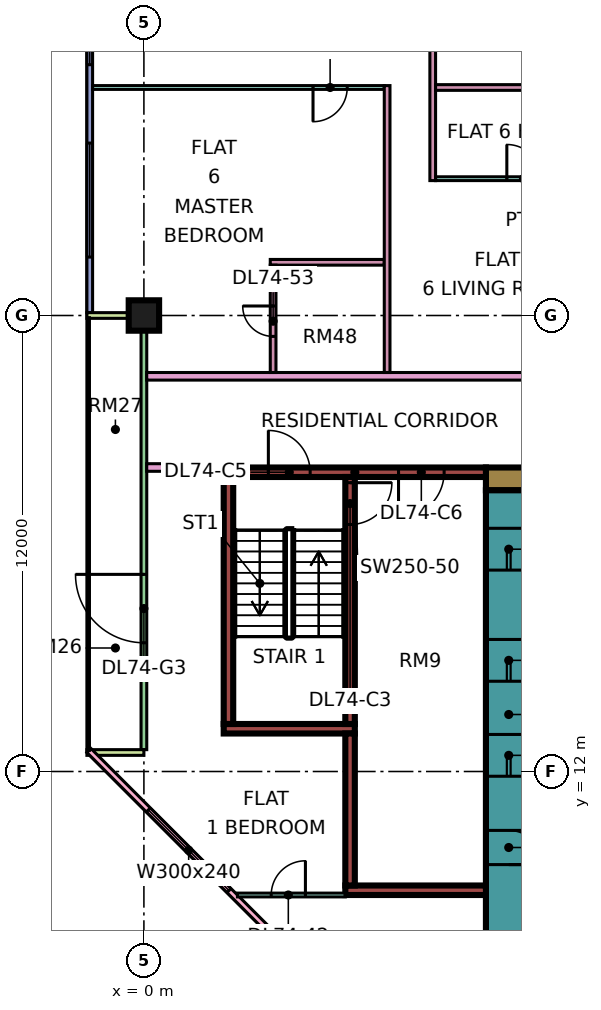
"""IFC4 building model, lengths in metres.
Left out: names, types, materials, properties, quantities, classifications, styles, units other than length and angle.
Written with IfcOpenShell. Run it as: python <this file> out.ifc"""

import sys

from ifc_helpers import new_model, si_unit, direction, frame, frame_2d, origin, origin_2d, place, context, subcontext, project, spatial, rectangle, extrude, element, fill, save


model = new_model("IFC4")
c1 = context("Model", 3, precision=1e-05, world=origin(), true_north=direction((0.0, 1.0)))
c2 = subcontext(c1, "Body", "Model", "MODEL_VIEW")
j1 = project(units=[si_unit("LENGTHUNIT", "METRE"), si_unit("PLANEANGLEUNIT", "RADIAN")], contexts=[c1])
p1 = place(None, origin())
s1 = spatial("IfcSite", under=j1, at=p1, CompositionType="ELEMENT")
p2 = place(p1, origin())
s2 = spatial("IfcBuilding", under=s1, at=p2, CompositionType="ELEMENT")
p3 = place(p2, frame((0.0, 0.0, 314.65)))
s3 = spatial("IfcBuildingStorey", under=s2, at=p3, CompositionType="ELEMENT", Elevation=314.65)
p4 = place(p3, frame((0.0, 24.0, 0.0), z_axis=(0.0, 0.0, 1.0), x_axis=(1.0, 0.0, 0.0)))
e1 = element("IfcColumn", 1, at=p4, inside=s3, PredefinedType="COLUMN", context=c2, shape_type="SweptSolid", body=[
    extrude(rectangle(XDim=0.8, YDim=0.8, at=origin_2d()), origin(), (0.0, 0.0, 1.0), 3.75),
])
p5 = place(p3, frame((9.0, 19.7, 0.0), z_axis=(0.0, 0.0, 1.0), x_axis=(1.0, 0.0, 0.0)))
e2 = element("IfcWall", 2, at=p5, inside=s3, PredefinedType="SHEAR", context=c2, shape_type="SweptSolid", body=[
    extrude(rectangle(XDim=25.0, YDim=0.6, at=frame_2d((12.5, 0.0))), origin(), (0.0, 0.0, 1.0), 3.75),
])
p6 = place(p5, frame((19.1, 0.0, 0.0)))
e3 = element("IfcOpeningElement", 3, at=p6, cuts=e2, PredefinedType="OPENING", context=c2, shape_type="SweptSolid", body=[
    extrude(rectangle(XDim=1.8, YDim=2.4, at=frame_2d((0.9, 1.2))), frame((0.0, 0.31, 0.0), z_axis=(0.0, -1.0, 0.0), x_axis=(1.0, 0.0, 0.0)), (0.0, 0.0, 1.0), 0.62),
])
p7 = place(p3, frame((9.6, 7.6, 0.0), z_axis=(0.0, 0.0, 1.0), x_axis=(0.0, 1.0, 0.0)))
e4 = element("IfcWall", 4, at=p7, inside=s3, PredefinedType="SHEAR", context=c2, shape_type="SweptSolid", body=[
    extrude(rectangle(XDim=11.8, YDim=1.2, at=frame_2d((5.9, 0.0))), origin(), (0.0, 0.0, 1.0), 3.75),
])
p8 = place(p7, frame((4.275, 0.0, 0.0)))
e5 = element("IfcOpeningElement", 5, at=p8, cuts=e4, PredefinedType="OPENING", context=c2, shape_type="SweptSolid", body=[
    extrude(rectangle(XDim=1.1, YDim=2.2, at=frame_2d((0.55, 1.1))), frame((0.0, 0.61, 0.0), z_axis=(0.0, -1.0, 0.0), x_axis=(1.0, 0.0, 0.0)), (0.0, 0.0, 1.0), 1.22),
])
p9 = place(p7, frame((6.775, 0.0, 0.0)))
e6 = element("IfcOpeningElement", 6, at=p9, cuts=e4, PredefinedType="OPENING", context=c2, shape_type="SweptSolid", body=[
    extrude(rectangle(XDim=1.1, YDim=2.2, at=frame_2d((0.55, 1.1))), frame((0.0, 0.61, 0.0), z_axis=(0.0, -1.0, 0.0), x_axis=(1.0, 0.0, 0.0)), (0.0, 0.0, 1.0), 1.22),
])
p10 = place(p7, frame((9.7, 0.0, 0.0)))
e7 = element("IfcOpeningElement", 7, at=p10, cuts=e4, PredefinedType="OPENING", context=c2, shape_type="SweptSolid", body=[
    extrude(rectangle(XDim=1.1, YDim=2.2, at=frame_2d((0.55, 1.1))), frame((0.0, 0.61, 0.0), z_axis=(0.0, -1.0, 0.0), x_axis=(1.0, 0.0, 0.0)), (0.0, 0.0, 1.0), 1.22),
])
p11 = place(p7, frame((1.95, 0.0, 0.0)))
e8 = element("IfcOpeningElement", 8, at=p11, cuts=e4, PredefinedType="OPENING", context=c2, shape_type="SweptSolid", body=[
    extrude(rectangle(XDim=0.9, YDim=2.1, at=frame_2d((0.45, 1.05))), frame((0.0, 0.61, 0.0), z_axis=(0.0, -1.0, 0.0), x_axis=(1.0, 0.0, 0.0)), (0.0, 0.0, 1.0), 1.22),
])
p12 = place(p3, frame((2.1, 19.875, 0.0), z_axis=(0.0, 0.0, 1.0), x_axis=(1.0, 0.0, 0.0)))
e9 = element("IfcWall", 9, at=p12, inside=s3, PredefinedType="SHEAR", context=c2, shape_type="SweptSolid", body=[
    extrude(rectangle(XDim=6.9, YDim=0.25, at=frame_2d((3.45, 0.0))), origin(), (0.0, 0.0, 1.0), 3.75),
])
p13 = place(p12, frame((1.175, 0.0, 0.0)))
e10 = element("IfcOpeningElement", 10, at=p13, cuts=e9, PredefinedType="OPENING", context=c2, shape_type="SweptSolid", body=[
    extrude(rectangle(XDim=1.1, YDim=2.2, at=frame_2d((0.55, 1.1))), frame((0.0, 0.135, 0.0), z_axis=(0.0, -1.0, 0.0), x_axis=(1.0, 0.0, 0.0)), (0.0, 0.0, 1.0), 0.27),
])
p14 = place(p12, frame((4.6, 0.0, 0.0)))
e11 = element("IfcOpeningElement", 11, at=p14, cuts=e9, PredefinedType="OPENING", context=c2, shape_type="SweptSolid", body=[
    extrude(rectangle(XDim=1.2, YDim=2.2, at=frame_2d((0.6, 1.1))), frame((0.0, 0.135, 0.0), z_axis=(0.0, -1.0, 0.0), x_axis=(1.0, 0.0, 0.0)), (0.0, 0.0, 1.0), 0.27),
])
p15 = place(p3, frame((2.1, 13.125, 0.0), z_axis=(0.0, 0.0, 1.0), x_axis=(1.0, 0.0, 0.0)))
e12 = element("IfcWall", 12, at=p15, inside=s3, PredefinedType="SHEAR", context=c2, shape_type="SweptSolid", body=[
    extrude(rectangle(XDim=3.45, YDim=0.25, at=frame_2d((1.725, 0.0))), origin(), (0.0, 0.0, 1.0), 3.75),
])
p16 = place(p3, frame((2.225, 13.25, 0.0), z_axis=(0.0, 0.0, 1.0), x_axis=(0.0, 1.0, 0.0)))
e13 = element("IfcWall", 13, at=p16, inside=s3, PredefinedType="SHEAR", context=c2, shape_type="SweptSolid", body=[
    extrude(rectangle(XDim=6.5, YDim=0.25, at=frame_2d((3.25, 0.0))), origin(), (0.0, 0.0, 1.0), 3.75),
])
p17 = place(p3, frame((5.425, 13.25, 0.0), z_axis=(0.0, 0.0, 1.0), x_axis=(0.0, 1.0, 0.0)))
e14 = element("IfcWall", 14, at=p17, inside=s3, PredefinedType="SHEAR", context=c2, shape_type="SweptSolid", body=[
    extrude(rectangle(XDim=6.5, YDim=0.25, at=frame_2d((3.25, 0.0))), origin(), (0.0, 0.0, 1.0), 3.75),
])
p18 = place(p17, frame((5.25, 0.0, 0.0)))
e15 = element("IfcOpeningElement", 15, at=p18, cuts=e14, PredefinedType="OPENING", context=c2, shape_type="SweptSolid", body=[
    extrude(rectangle(XDim=1.1, YDim=2.2, at=frame_2d((0.55, 1.1))), frame((0.0, 0.135, 0.0), z_axis=(0.0, -1.0, 0.0), x_axis=(1.0, 0.0, 0.0)), (0.0, 0.0, 1.0), 0.27),
])
p19 = place(p3, frame((5.3, 8.875, 0.0), z_axis=(0.0, 0.0, 1.0), x_axis=(1.0, 0.0, 0.0)))
e16 = element("IfcWall", 16, at=p19, inside=s3, PredefinedType="SHEAR", context=c2, shape_type="SweptSolid", body=[
    extrude(rectangle(XDim=3.7, YDim=0.25, at=frame_2d((1.85, 0.0))), origin(), (0.0, 0.0, 1.0), 3.75),
])
p20 = place(p3, frame((5.425, 9.0, 0.0), z_axis=(0.0, 0.0, 1.0), x_axis=(0.0, 1.0, 0.0)))
e17 = element("IfcWall", 17, at=p20, inside=s3, PredefinedType="SHEAR", context=c2, shape_type="SweptSolid", body=[
    extrude(rectangle(XDim=4.0, YDim=0.25, at=frame_2d((2.0, 0.0))), origin(), (0.0, 0.0, 1.0), 3.75),
])
p21 = place(p3, frame((-1.425, 35.925, 0.0), z_axis=(0.0, 0.0, 1.0), x_axis=(0.0, -1.0, 0.0)))
e18 = element("IfcWall", 18, at=p21, inside=s3, PredefinedType="SOLIDWALL", context=c2, shape_type="SweptSolid", body=[
    extrude(rectangle(XDim=11.85, YDim=0.15, at=frame_2d((5.925, 0.0))), origin(), (0.0, 0.0, 1.0), 3.35),
])
p22 = place(p21, frame((0.562, 0.0, 0.45)))
e19 = element("IfcOpeningElement", 19, at=p22, cuts=e18, PredefinedType="OPENING", context=c2, shape_type="SweptSolid", body=[
    extrude(rectangle(XDim=1.8, YDim=2.4, at=frame_2d((0.9, 1.2))), frame((0.0, 0.085, 0.0), z_axis=(0.0, -1.0, 0.0), x_axis=(1.0, 0.0, 0.0)), (0.0, 0.0, 1.0), 0.17),
])
p23 = place(p21, frame((3.525, 0.0, 0.45)))
e20 = element("IfcOpeningElement", 20, at=p23, cuts=e18, PredefinedType="OPENING", context=c2, shape_type="SweptSolid", body=[
    extrude(rectangle(XDim=1.8, YDim=2.4, at=frame_2d((0.9, 1.2))), frame((0.0, 0.085, 0.0), z_axis=(0.0, -1.0, 0.0), x_axis=(1.0, 0.0, 0.0)), (0.0, 0.0, 1.0), 0.17),
])
p24 = place(p21, frame((7.387, 0.0, 0.45)))
e21 = element("IfcOpeningElement", 21, at=p24, cuts=e18, PredefinedType="OPENING", context=c2, shape_type="SweptSolid", body=[
    extrude(rectangle(XDim=3.0, YDim=2.4, at=frame_2d((1.5, 1.2))), frame((0.0, 0.085, 0.0), z_axis=(0.0, -1.0, 0.0), x_axis=(1.0, 0.0, 0.0)), (0.0, 0.0, 1.0), 0.17),
])
p25 = place(p3, frame((0.0, 23.925, 0.0), z_axis=(0.0, 0.0, 1.0), x_axis=(0.0, -1.0, 0.0)))
e22 = element("IfcWall", 22, at=p25, inside=s3, PredefinedType="SOLIDWALL", context=c2, shape_type="SweptSolid", body=[
    extrude(rectangle(XDim=11.35, YDim=0.15, at=frame_2d((5.675, 0.0))), origin(), (0.0, 0.0, 1.0), 3.35),
])
p26 = place(p25, frame((6.738, 0.0, 0.0)))
e23 = element("IfcOpeningElement", 23, at=p26, cuts=e22, PredefinedType="OPENING", context=c2, shape_type="SweptSolid", body=[
    extrude(rectangle(XDim=1.8, YDim=2.4, at=frame_2d((0.9, 1.2))), frame((0.0, 0.085, 0.0), z_axis=(0.0, -1.0, 0.0), x_axis=(1.0, 0.0, 0.0)), (0.0, 0.0, 1.0), 0.17),
])
for number, where, z_axis, x_axis in (
    (24, (-1.5, 24.0, 0.0), (0.0, 0.0, 1.0), (1.0, 0.0, 0.0)),
    (25, (-1.5, 12.5, 0.0), (0.0, 0.0, 1.0), (1.0, 0.0, 0.0)),
):
    element("IfcWall", number, at=place(p3, frame(where, z_axis=z_axis, x_axis=x_axis)), inside=s3, PredefinedType="SOLIDWALL", context=c2, shape_type="SweptSolid", body=[
        extrude(rectangle(XDim=1.5, YDim=0.15, at=frame_2d((0.75, 0.0))), origin(), (0.0, 0.0, 1.0), 3.35),
    ])
p27 = place(p3, frame((-1.447, 12.553, 0.0), z_axis=(0.0, 0.0, 1.0), x_axis=(0.707106781187, -0.707106781187, 0.0)))
e26 = element("IfcWall", 26, at=p27, inside=s3, PredefinedType="SOLIDWALL", context=c2, shape_type="SweptSolid", body=[
    extrude(rectangle(XDim=19.799, YDim=0.15, at=frame_2d((9.899, 0.0))), origin(), (0.0, 0.0, 1.0), 3.35),
])
p28 = place(p27, frame((2.212, 0.0, 0.45)))
e27 = element("IfcOpeningElement", 27, at=p28, cuts=e26, PredefinedType="OPENING", context=c2, shape_type="SweptSolid", body=[
    extrude(rectangle(XDim=3.0, YDim=2.4, at=frame_2d((1.5, 1.2))), frame((0.0, 0.085, 0.0), z_axis=(0.0, -1.0, 0.0), x_axis=(1.0, 0.0, 0.0)), (0.0, 0.0, 1.0), 0.17),
])
p29 = place(p27, frame((10.216, 0.0, 0.45)))
e28 = element("IfcOpeningElement", 28, at=p29, cuts=e26, PredefinedType="OPENING", context=c2, shape_type="SweptSolid", body=[
    extrude(rectangle(XDim=3.0, YDim=2.4, at=frame_2d((1.5, 1.2))), frame((0.0, 0.085, 0.0), z_axis=(0.0, -1.0, 0.0), x_axis=(1.0, 0.0, 0.0)), (0.0, 0.0, 1.0), 0.17),
])
p30 = place(p3, frame((-1.35, 30.0, 0.0), z_axis=(0.0, 0.0, 1.0), x_axis=(1.0, 0.0, 0.0)))
e29 = element("IfcWall", 29, at=p30, inside=s3, PredefinedType="PARTITIONING", context=c2, shape_type="SweptSolid", body=[
    extrude(rectangle(XDim=7.675, YDim=0.1, at=frame_2d((3.837, 0.0))), origin(), (0.0, 0.0, 1.0), 3.35),
])
p31 = place(p30, frame((5.8, 0.0, 0.0)))
e30 = element("IfcOpeningElement", 30, at=p31, cuts=e29, PredefinedType="OPENING", context=c2, shape_type="SweptSolid", body=[
    extrude(rectangle(XDim=0.9, YDim=2.1, at=frame_2d((0.45, 1.05))), frame((0.0, 0.06, 0.0), z_axis=(0.0, -1.0, 0.0), x_axis=(1.0, 0.0, 0.0)), (0.0, 0.0, 1.0), 0.12),
])
p32 = place(p3, frame((0.074, 20.0, 0.0), z_axis=(0.0, 0.0, 1.0), x_axis=(1.0, 0.0, 0.0)))
e31 = element("IfcWall", 31, at=p32, inside=s3, PredefinedType="PARTITIONING", context=c2, shape_type="SweptSolid", body=[
    extrude(rectangle(XDim=2.026, YDim=0.2, at=frame_2d((1.013, 0.0))), origin(), (0.0, 0.0, 1.0), 3.35),
])
p33 = place(p3, frame((0.074, 22.4, 0.0), z_axis=(0.0, 0.0, 1.0), x_axis=(1.0, 0.0, 0.0)))
e32 = element("IfcWall", 32, at=p33, inside=s3, PredefinedType="PARTITIONING", context=c2, shape_type="SweptSolid", body=[
    extrude(rectangle(XDim=12.226, YDim=0.2, at=frame_2d((6.113, 0.0))), origin(), (0.0, 0.0, 1.0), 3.35),
])
p34 = place(p3, frame((2.461, 8.75, 0.0), z_axis=(0.0, 0.0, 1.0), x_axis=(1.0, 0.0, 0.0)))
e33 = element("IfcWall", 33, at=p34, inside=s3, PredefinedType="PARTITIONING", context=c2, shape_type="SweptSolid", body=[
    extrude(rectangle(XDim=2.839, YDim=0.1, at=frame_2d((1.419, 0.0))), origin(), (0.0, 0.0, 1.0), 3.35),
])
p35 = place(p34, frame((0.889, 0.0, 0.0)))
e34 = element("IfcOpeningElement", 34, at=p35, cuts=e33, PredefinedType="OPENING", context=c2, shape_type="SweptSolid", body=[
    extrude(rectangle(XDim=0.9, YDim=2.1, at=frame_2d((0.45, 1.05))), frame((0.0, 0.06, 0.0), z_axis=(0.0, -1.0, 0.0), x_axis=(1.0, 0.0, 0.0)), (0.0, 0.0, 1.0), 0.12),
])
p36 = place(p3, frame((3.325, 25.4, 0.0), z_axis=(0.0, 0.0, 1.0), x_axis=(1.0, 0.0, 0.0)))
e35 = element("IfcWall", 35, at=p36, inside=s3, PredefinedType="PARTITIONING", context=c2, shape_type="SweptSolid", body=[
    extrude(rectangle(XDim=3.0, YDim=0.15, at=frame_2d((1.5, 0.0))), origin(), (0.0, 0.0, 1.0), 3.35),
])
p37 = place(p3, frame((3.4, 22.5, 0.0), z_axis=(0.0, 0.0, 1.0), x_axis=(0.0, 1.0, 0.0)))
e36 = element("IfcWall", 36, at=p37, inside=s3, PredefinedType="PARTITIONING", context=c2, shape_type="SweptSolid", body=[
    extrude(rectangle(XDim=2.825, YDim=0.15, at=frame_2d((1.413, 0.0))), origin(), (0.0, 0.0, 1.0), 3.35),
])
p38 = place(p37, frame((0.95, 0.0, 0.0)))
e37 = element("IfcOpeningElement", 37, at=p38, cuts=e36, PredefinedType="OPENING", context=c2, shape_type="SweptSolid", body=[
    extrude(rectangle(XDim=0.8, YDim=2.1, at=frame_2d((0.4, 1.05))), frame((0.0, 0.085, 0.0), z_axis=(0.0, -1.0, 0.0), x_axis=(1.0, 0.0, 0.0)), (0.0, 0.0, 1.0), 0.17),
])
p39 = place(p3, frame((6.4, 22.5, 0.0), z_axis=(0.0, 0.0, 1.0), x_axis=(0.0, 1.0, 0.0)))
e38 = element("IfcWall", 38, at=p39, inside=s3, PredefinedType="PARTITIONING", context=c2, shape_type="SweptSolid", body=[
    extrude(rectangle(XDim=7.55, YDim=0.15, at=frame_2d((3.775, 0.0))), origin(), (0.0, 0.0, 1.0), 3.35),
])
p40 = place(p3, frame((7.6, 27.55, 0.0), z_axis=(0.0, 0.0, 1.0), x_axis=(0.0, 1.0, 0.0)))
e39 = element("IfcWall", 39, at=p40, inside=s3, PredefinedType="PARTITIONING", context=c2, shape_type="SweptSolid", body=[
    extrude(rectangle(XDim=8.35, YDim=0.15, at=frame_2d((4.175, 0.0))), origin(), (0.0, 0.0, 1.0), 3.35),
])
p41 = place(p40, frame((3.65, 0.0, 0.0)))
e40 = element("IfcOpeningElement", 40, at=p41, cuts=e39, PredefinedType="OPENING", context=c2, shape_type="SweptSolid", body=[
    extrude(rectangle(XDim=0.8, YDim=2.1, at=frame_2d((0.4, 1.05))), frame((0.0, 0.085, 0.0), z_axis=(0.0, -1.0, 0.0), x_axis=(1.0, 0.0, 0.0)), (0.0, 0.0, 1.0), 0.17),
])
p42 = place(p40, frame((6.65, 0.0, 0.0)))
e41 = element("IfcOpeningElement", 41, at=p42, cuts=e39, PredefinedType="OPENING", context=c2, shape_type="SweptSolid", body=[
    extrude(rectangle(XDim=0.9, YDim=2.1, at=frame_2d((0.45, 1.05))), frame((0.0, 0.085, 0.0), z_axis=(0.0, -1.0, 0.0), x_axis=(1.0, 0.0, 0.0)), (0.0, 0.0, 1.0), 0.17),
])
p43 = place(p3, frame((7.675, 27.6, 0.0), z_axis=(0.0, 0.0, 1.0), x_axis=(1.0, 0.0, 0.0)))
e42 = element("IfcWall", 42, at=p43, inside=s3, PredefinedType="PARTITIONING", context=c2, shape_type="SweptSolid", body=[
    extrude(rectangle(XDim=4.625, YDim=0.1, at=frame_2d((2.312, 0.0))), origin(), (0.0, 0.0, 1.0), 3.35),
])
p44 = place(p43, frame((1.875, 0.0, 0.0)))
e43 = element("IfcOpeningElement", 43, at=p44, cuts=e42, PredefinedType="OPENING", context=c2, shape_type="SweptSolid", body=[
    extrude(rectangle(XDim=0.9, YDim=2.1, at=frame_2d((0.45, 1.05))), frame((0.0, 0.06, 0.0), z_axis=(0.0, -1.0, 0.0), x_axis=(1.0, 0.0, 0.0)), (0.0, 0.0, 1.0), 0.12),
])
p45 = place(p3, frame((7.675, 30.0, 0.0), z_axis=(0.0, 0.0, 1.0), x_axis=(1.0, 0.0, 0.0)))
e44 = element("IfcWall", 44, at=p45, inside=s3, PredefinedType="PARTITIONING", context=c2, shape_type="SweptSolid", body=[
    extrude(rectangle(XDim=4.625, YDim=0.15, at=frame_2d((2.312, 0.0))), origin(), (0.0, 0.0, 1.0), 3.35),
])
p46 = place(p23, origin())
e45 = element("IfcWindow", 45, at=p46, inside=s3, PartitioningType="SINGLE_PANEL", PredefinedType="WINDOW", context=c2, shape_type="SweptSolid", body=[
    extrude(rectangle(XDim=1.8, YDim=2.4, at=frame_2d((0.9, 1.2))), frame((0.0, 0.03, 0.0), z_axis=(0.0, -1.0, 0.0), x_axis=(1.0, 0.0, 0.0)), (0.0, 0.0, 1.0), 0.06),
])
fill(e20, e45)
p47 = place(p24, origin())
e46 = element("IfcWindow", 46, at=p47, inside=s3, PartitioningType="SINGLE_PANEL", PredefinedType="WINDOW", context=c2, shape_type="SweptSolid", body=[
    extrude(rectangle(XDim=3.0, YDim=2.4, at=frame_2d((1.5, 1.2))), frame((0.0, 0.03, 0.0), z_axis=(0.0, -1.0, 0.0), x_axis=(1.0, 0.0, 0.0)), (0.0, 0.0, 1.0), 0.06),
])
fill(e21, e46)
p48 = place(p26, frame((1.8, 0.0, 0.0), z_axis=(0.0, 0.0, 1.0), x_axis=(-1.0, 0.0, 0.0)))
e47 = element("IfcDoor", 47, at=p48, inside=s3, OperationType="DOUBLE_DOOR_SINGLE_SWING", PredefinedType="DOOR", context=c2, shape_type="SweptSolid", body=[
    extrude(rectangle(XDim=1.8, YDim=2.4, at=frame_2d((0.9, 1.2))), frame((0.0, 0.025, 0.0), z_axis=(0.0, -1.0, 0.0), x_axis=(1.0, 0.0, 0.0)), (0.0, 0.0, 1.0), 0.05),
])
fill(e23, e47)
p49 = place(p28, origin())
e48 = element("IfcWindow", 48, at=p49, inside=s3, PartitioningType="SINGLE_PANEL", PredefinedType="WINDOW", context=c2, shape_type="SweptSolid", body=[
    extrude(rectangle(XDim=3.0, YDim=2.4, at=frame_2d((1.5, 1.2))), frame((0.0, 0.03, 0.0), z_axis=(0.0, -1.0, 0.0), x_axis=(1.0, 0.0, 0.0)), (0.0, 0.0, 1.0), 0.06),
])
fill(e27, e48)
p50 = place(p8, origin())
e49 = element("IfcDoor", 49, at=p50, inside=s3, OperationType="DOUBLE_DOOR_SLIDING", PredefinedType="DOOR", context=c2, shape_type="SweptSolid", body=[
    extrude(rectangle(XDim=1.1, YDim=2.2, at=frame_2d((0.55, 1.1))), frame((0.0, 0.025, 0.0), z_axis=(0.0, -1.0, 0.0), x_axis=(1.0, 0.0, 0.0)), (0.0, 0.0, 1.0), 0.05),
])
fill(e5, e49)
p51 = place(p9, origin())
e50 = element("IfcDoor", 50, at=p51, inside=s3, OperationType="DOUBLE_DOOR_SLIDING", PredefinedType="DOOR", context=c2, shape_type="SweptSolid", body=[
    extrude(rectangle(XDim=1.1, YDim=2.2, at=frame_2d((0.55, 1.1))), frame((0.0, 0.025, 0.0), z_axis=(0.0, -1.0, 0.0), x_axis=(1.0, 0.0, 0.0)), (0.0, 0.0, 1.0), 0.05),
])
fill(e6, e50)
p52 = place(p10, origin())
e51 = element("IfcDoor", 51, at=p52, inside=s3, OperationType="DOUBLE_DOOR_SLIDING", PredefinedType="DOOR", context=c2, shape_type="SweptSolid", body=[
    extrude(rectangle(XDim=1.1, YDim=2.2, at=frame_2d((0.55, 1.1))), frame((0.0, 0.025, 0.0), z_axis=(0.0, -1.0, 0.0), x_axis=(1.0, 0.0, 0.0)), (0.0, 0.0, 1.0), 0.05),
])
fill(e7, e51)
p53 = place(p18, origin())
e52 = element("IfcDoor", 52, at=p53, inside=s3, OperationType="SINGLE_SWING_RIGHT", PredefinedType="DOOR", context=c2, shape_type="SweptSolid", body=[
    extrude(rectangle(XDim=1.1, YDim=2.2, at=frame_2d((0.55, 1.1))), frame((0.0, 0.025, 0.0), z_axis=(0.0, -1.0, 0.0), x_axis=(1.0, 0.0, 0.0)), (0.0, 0.0, 1.0), 0.05),
])
fill(e15, e52)
p54 = place(p11, frame((0.9, 0.0, 0.0), z_axis=(0.0, 0.0, 1.0), x_axis=(-1.0, 0.0, 0.0)))
e53 = element("IfcDoor", 53, at=p54, inside=s3, OperationType="SINGLE_SWING_LEFT", PredefinedType="DOOR", context=c2, shape_type="SweptSolid", body=[
    extrude(rectangle(XDim=0.9, YDim=2.1, at=frame_2d((0.45, 1.05))), frame((0.0, 0.025, 0.0), z_axis=(0.0, -1.0, 0.0), x_axis=(1.0, 0.0, 0.0)), (0.0, 0.0, 1.0), 0.05),
])
fill(e8, e53)
p55 = place(p13, origin())
e54 = element("IfcDoor", 54, at=p55, inside=s3, OperationType="SINGLE_SWING_LEFT", PredefinedType="DOOR", context=c2, shape_type="SweptSolid", body=[
    extrude(rectangle(XDim=1.1, YDim=2.2, at=frame_2d((0.55, 1.1))), frame((0.0, 0.025, 0.0), z_axis=(0.0, -1.0, 0.0), x_axis=(1.0, 0.0, 0.0)), (0.0, 0.0, 1.0), 0.05),
])
fill(e10, e54)
p56 = place(p14, frame((1.2, 0.0, 0.0), z_axis=(0.0, 0.0, 1.0), x_axis=(-1.0, 0.0, 0.0)))
e55 = element("IfcDoor", 55, at=p56, inside=s3, OperationType="SINGLE_SWING_LEFT", PredefinedType="DOOR", context=c2, shape_type="SweptSolid", body=[
    extrude(rectangle(XDim=1.2, YDim=2.2, at=frame_2d((0.6, 1.1))), frame((0.0, 0.025, 0.0), z_axis=(0.0, -1.0, 0.0), x_axis=(1.0, 0.0, 0.0)), (0.0, 0.0, 1.0), 0.05),
])
fill(e11, e55)
p57 = place(p35, frame((0.9, 0.0, 0.0), z_axis=(0.0, 0.0, 1.0), x_axis=(-1.0, 0.0, 0.0)))
e56 = element("IfcDoor", 56, at=p57, inside=s3, OperationType="SINGLE_SWING_RIGHT", PredefinedType="DOOR", context=c2, shape_type="SweptSolid", body=[
    extrude(rectangle(XDim=0.9, YDim=2.1, at=frame_2d((0.45, 1.05))), frame((0.0, 0.025, 0.0), z_axis=(0.0, -1.0, 0.0), x_axis=(1.0, 0.0, 0.0)), (0.0, 0.0, 1.0), 0.05),
])
fill(e34, e56)
p58 = place(p31, frame((0.9, 0.0, 0.0), z_axis=(0.0, 0.0, 1.0), x_axis=(-1.0, 0.0, 0.0)))
e57 = element("IfcDoor", 57, at=p58, inside=s3, OperationType="SINGLE_SWING_LEFT", PredefinedType="DOOR", context=c2, shape_type="SweptSolid", body=[
    extrude(rectangle(XDim=0.9, YDim=2.1, at=frame_2d((0.45, 1.05))), frame((0.0, 0.025, 0.0), z_axis=(0.0, -1.0, 0.0), x_axis=(1.0, 0.0, 0.0)), (0.0, 0.0, 1.0), 0.05),
])
fill(e30, e57)
p59 = place(p38, frame((0.8, 0.0, 0.0), z_axis=(0.0, 0.0, 1.0), x_axis=(-1.0, 0.0, 0.0)))
e58 = element("IfcDoor", 58, at=p59, inside=s3, OperationType="SINGLE_SWING_RIGHT", PredefinedType="DOOR", context=c2, shape_type="SweptSolid", body=[
    extrude(rectangle(XDim=0.8, YDim=2.1, at=frame_2d((0.4, 1.05))), frame((0.0, 0.025, 0.0), z_axis=(0.0, -1.0, 0.0), x_axis=(1.0, 0.0, 0.0)), (0.0, 0.0, 1.0), 0.05),
])
fill(e37, e58)
p60 = place(p44, origin())
e59 = element("IfcDoor", 59, at=p60, inside=s3, OperationType="SINGLE_SWING_LEFT", PredefinedType="DOOR", context=c2, shape_type="SweptSolid", body=[
    extrude(rectangle(XDim=0.9, YDim=2.1, at=frame_2d((0.45, 1.05))), frame((0.0, 0.025, 0.0), z_axis=(0.0, -1.0, 0.0), x_axis=(1.0, 0.0, 0.0)), (0.0, 0.0, 1.0), 0.05),
])
fill(e43, e59)
save(model, sys.argv[1])
